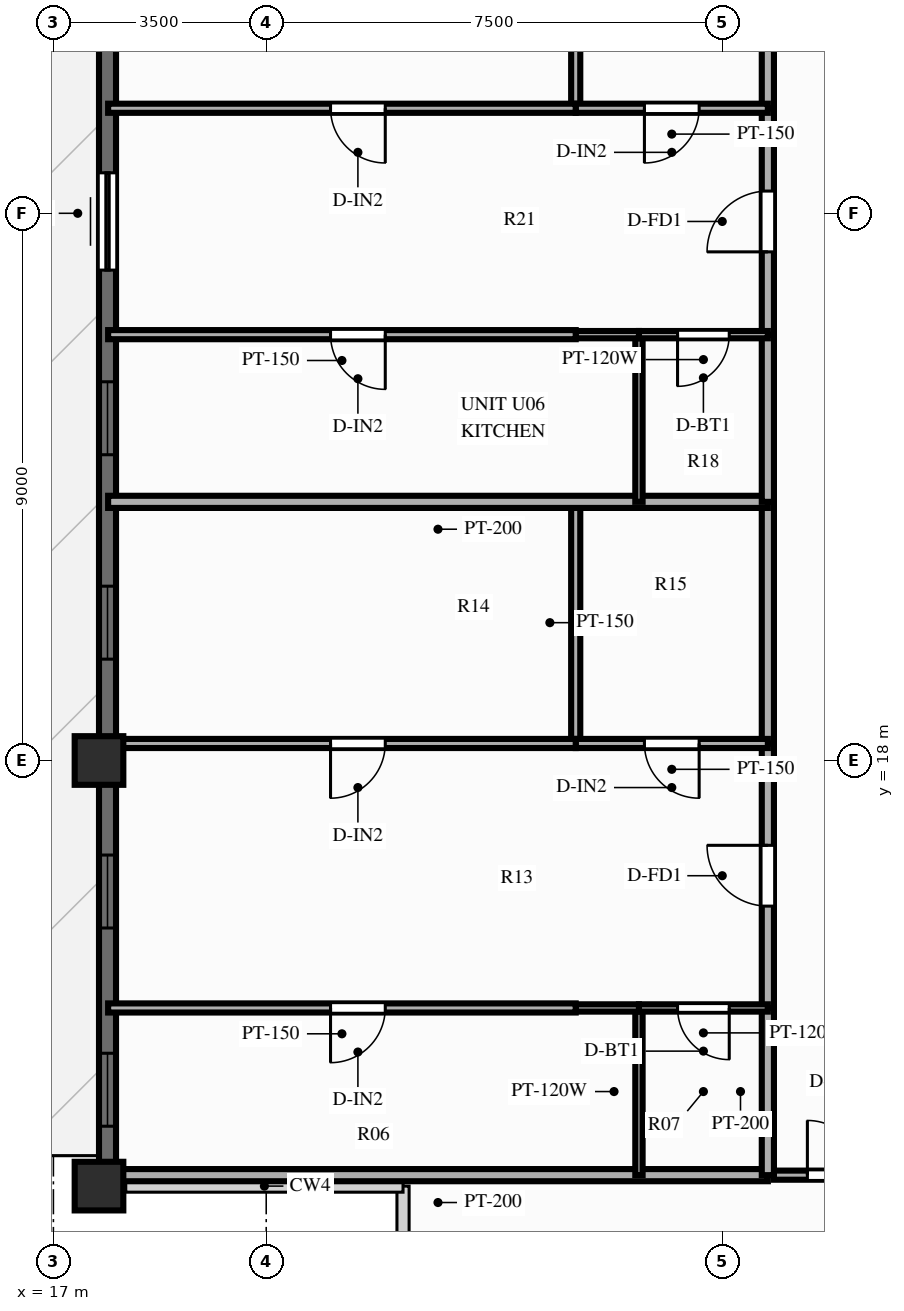
"""IFC4 building model, lengths in metres.
Left out: names, types, materials, properties, quantities, classifications, styles, units other than length and angle.
Written with IfcOpenShell. Run it as: python <this file> out.ifc"""

import sys

from ifc_helpers import new_model, si_unit, direction, frame, frame_2d, origin, origin_2d, place, context, subcontext, project, spatial, rectangle, extrude, source, transform, mapped, element, fill, save


model = new_model("IFC4")
c1 = context("Model", 3, precision=1e-05, world=origin(), true_north=direction((0.0, 1.0)))
c2 = subcontext(c1, "Body", "Model", "MODEL_VIEW")
j1 = project(units=[si_unit("LENGTHUNIT", "METRE"), si_unit("PLANEANGLEUNIT", "RADIAN")], contexts=[c1])
p1 = place(None, origin())
s1 = spatial("IfcSite", under=j1, at=p1, CompositionType="ELEMENT")
p2 = place(p1, origin())
s2 = spatial("IfcBuilding", under=s1, at=p2, CompositionType="ELEMENT")
p3 = place(p2, frame((0.0, 0.0, 176.8)))
s3 = spatial("IfcBuildingStorey", under=s2, at=p3, CompositionType="ELEMENT", Elevation=176.8)
m1 = source(origin(), c2, "Body", "SweptSolid", [
    extrude(rectangle(XDim=0.8, YDim=0.8, at=origin_2d()), origin(), (0.0, 0.0, 1.0), 3.0),
])
for number, where, z_axis, x_axis in (
    (1, (17.75, 18.0, 0.0), (0.0, 0.0, 1.0), (1.0, 0.0, 0.0)),
    (2, (17.75, 11.0, 0.0), (0.0, 0.0, 1.0), (1.0, 0.0, 0.0)),
):
    element("IfcColumn", number, at=place(p3, frame(where, z_axis=z_axis, x_axis=x_axis)), inside=s3, PredefinedType="COLUMN", context=c2, shape_type="MappedRepresentation", body=[
        mapped(m1, transform((0.0, 0.0, 0.0), scale=1.0)),
    ])
p4 = place(p3, frame((17.89, 11.0, 0.0), z_axis=(0.0, 0.0, 1.0), x_axis=(0.0, 1.0, 0.0)))
e3 = element("IfcWall", 3, at=p4, inside=s3, PredefinedType="SOLIDWALL", context=c2, shape_type="SweptSolid", body=[
    extrude(rectangle(XDim=32.0, YDim=0.28, at=frame_2d((16.0, 0.0))), origin(), (0.0, 0.0, 1.0), 2.28),
])
p5 = place(p4, frame((0.985, 0.0, 0.25)))
e4 = element("IfcOpeningElement", 4, at=p5, cuts=e3, PredefinedType="OPENING", context=c2, shape_type="SweptSolid", body=[
    extrude(rectangle(XDim=1.2, YDim=1.5, at=frame_2d((0.6, 0.75))), frame((0.0, 0.152, 0.0), z_axis=(0.0, -1.0, 0.0), x_axis=(1.0, 0.0, 0.0)), (0.0, 0.0, 1.0), 0.304),
])
p6 = place(p4, frame((4.245, 0.0, 0.25)))
e5 = element("IfcOpeningElement", 5, at=p6, cuts=e3, PredefinedType="OPENING", context=c2, shape_type="SweptSolid", body=[
    extrude(rectangle(XDim=1.2, YDim=1.5, at=frame_2d((0.6, 0.75))), frame((0.0, 0.152, 0.0), z_axis=(0.0, -1.0, 0.0), x_axis=(1.0, 0.0, 0.0)), (0.0, 0.0, 1.0), 0.304),
])
p7 = place(p4, frame((8.667, 0.0, 0.25)))
e6 = element("IfcOpeningElement", 6, at=p7, cuts=e3, PredefinedType="OPENING", context=c2, shape_type="SweptSolid", body=[
    extrude(rectangle(XDim=1.2, YDim=1.5, at=frame_2d((0.6, 0.75))), frame((0.0, 0.152, 0.0), z_axis=(0.0, -1.0, 0.0), x_axis=(1.0, 0.0, 0.0)), (0.0, 0.0, 1.0), 0.304),
])
p8 = place(p4, frame((12.029, 0.0, 0.25)))
e7 = element("IfcOpeningElement", 7, at=p8, cuts=e3, PredefinedType="OPENING", context=c2, shape_type="SweptSolid", body=[
    extrude(rectangle(XDim=1.2, YDim=1.5, at=frame_2d((0.6, 0.75))), frame((0.0, 0.152, 0.0), z_axis=(0.0, -1.0, 0.0), x_axis=(1.0, 0.0, 0.0)), (0.0, 0.0, 1.0), 0.304),
])
p9 = place(p4, frame((15.066, 0.0, 0.0)))
e8 = element("IfcOpeningElement", 8, at=p9, cuts=e3, PredefinedType="OPENING", context=c2, shape_type="SweptSolid", body=[
    extrude(rectangle(XDim=1.6, YDim=2.15, at=frame_2d((0.8, 1.075))), frame((0.0, 0.152, 0.0), z_axis=(0.0, -1.0, 0.0), x_axis=(1.0, 0.0, 0.0)), (0.0, 0.0, 1.0), 0.304),
])
p10 = place(p4, frame((19.111, 0.0, 0.25)))
e9 = element("IfcOpeningElement", 9, at=p10, cuts=e3, PredefinedType="OPENING", context=c2, shape_type="SweptSolid", body=[
    extrude(rectangle(XDim=1.2, YDim=1.5, at=frame_2d((0.6, 0.75))), frame((0.0, 0.152, 0.0), z_axis=(0.0, -1.0, 0.0), x_axis=(1.0, 0.0, 0.0)), (0.0, 0.0, 1.0), 0.304),
])
p11 = place(p4, frame((22.47, 0.0, 0.25)))
e10 = element("IfcOpeningElement", 10, at=p11, cuts=e3, PredefinedType="OPENING", context=c2, shape_type="SweptSolid", body=[
    extrude(rectangle(XDim=1.2, YDim=1.5, at=frame_2d((0.6, 0.75))), frame((0.0, 0.152, 0.0), z_axis=(0.0, -1.0, 0.0), x_axis=(1.0, 0.0, 0.0)), (0.0, 0.0, 1.0), 0.304),
])
p12 = place(p4, frame((26.006, 0.0, 0.25)))
e11 = element("IfcOpeningElement", 11, at=p12, cuts=e3, PredefinedType="OPENING", context=c2, shape_type="SweptSolid", body=[
    extrude(rectangle(XDim=1.2, YDim=1.5, at=frame_2d((0.6, 0.75))), frame((0.0, 0.152, 0.0), z_axis=(0.0, -1.0, 0.0), x_axis=(1.0, 0.0, 0.0)), (0.0, 0.0, 1.0), 0.304),
])
p13 = place(p4, frame((29.266, 0.0, 0.25)))
e12 = element("IfcOpeningElement", 12, at=p13, cuts=e3, PredefinedType="OPENING", context=c2, shape_type="SweptSolid", body=[
    extrude(rectangle(XDim=1.2, YDim=1.5, at=frame_2d((0.6, 0.75))), frame((0.0, 0.152, 0.0), z_axis=(0.0, -1.0, 0.0), x_axis=(1.0, 0.0, 0.0)), (0.0, 0.0, 1.0), 0.304),
])
p14 = place(p3, frame((28.85, 11.18, 0.0), z_axis=(0.0, 0.0, 1.0), x_axis=(1.0, 0.0, 0.0)))
e13 = element("IfcWall", 13, at=p14, inside=s3, PredefinedType="PARTITIONING", context=c2, shape_type="SweptSolid", body=[
    extrude(rectangle(XDim=2.33, YDim=0.15, at=frame_2d((1.165, 0.0))), origin(), (0.0, 0.0, 1.0), 2.79),
])
p15 = place(p14, frame((0.55, 0.0, 0.0)))
e14 = element("IfcOpeningElement", 14, at=p15, cuts=e13, PredefinedType="OPENING", context=c2, shape_type="SweptSolid", body=[
    extrude(rectangle(XDim=0.9, YDim=2.1, at=frame_2d((0.45, 1.05))), frame((0.0, 0.087, 0.0), z_axis=(0.0, -1.0, 0.0), x_axis=(1.0, 0.0, 0.0)), (0.0, 0.0, 1.0), 0.174),
])
p16 = place(p3, frame((28.75, 11.18, 0.0), z_axis=(0.0, 0.0, 1.0), x_axis=(-1.0, 0.0, 0.0)))
e15 = element("IfcWall", 15, at=p16, inside=s3, PredefinedType="PARTITIONING", context=c2, shape_type="SweptSolid", body=[
    extrude(rectangle(XDim=10.85, YDim=0.2, at=frame_2d((5.425, 0.0))), origin(), (0.0, 0.0, 1.0), 2.79),
])
p17 = place(p3, frame((28.75, 11.18, 0.0), z_axis=(0.0, 0.0, 1.0), x_axis=(0.0, 1.0, 0.0)))
e16 = element("IfcWall", 16, at=p17, inside=s3, PredefinedType="PARTITIONING", context=c2, shape_type="SweptSolid", body=[
    extrude(rectangle(XDim=2.75, YDim=0.2, at=frame_2d((1.375, 0.0))), origin(), (0.0, 0.0, 1.0), 2.79),
])
p18 = place(p3, frame((28.75, 13.93, 0.0), z_axis=(0.0, 0.0, 1.0), x_axis=(0.0, 1.0, 0.0)))
e17 = element("IfcWall", 17, at=p18, inside=s3, PredefinedType="PARTITIONING", context=c2, shape_type="SweptSolid", body=[
    extrude(rectangle(XDim=4.35, YDim=0.2, at=frame_2d((2.175, 0.0))), origin(), (0.0, 0.0, 1.0), 2.79),
])
p19 = place(p18, frame((1.675, 0.0, 0.0)))
e18 = element("IfcOpeningElement", 18, at=p19, cuts=e17, PredefinedType="OPENING", context=c2, shape_type="SweptSolid", body=[
    extrude(rectangle(XDim=1.0, YDim=2.15, at=frame_2d((0.5, 1.075))), frame((0.0, 0.112, 0.0), z_axis=(0.0, -1.0, 0.0), x_axis=(1.0, 0.0, 0.0)), (0.0, 0.0, 1.0), 0.224),
])
p20 = place(p3, frame((28.75, 18.28, 0.0), z_axis=(0.0, 0.0, 1.0), x_axis=(0.0, 1.0, 0.0)))
e19 = element("IfcWall", 19, at=p20, inside=s3, PredefinedType="PARTITIONING", context=c2, shape_type="SweptSolid", body=[
    extrude(rectangle(XDim=3.974, YDim=0.2, at=frame_2d((1.987, 0.0))), origin(), (0.0, 0.0, 1.0), 2.79),
])
p21 = place(p3, frame((26.63, 11.18, 0.0), z_axis=(0.0, 0.0, 1.0), x_axis=(0.0, 1.0, 0.0)))
e20 = element("IfcWall", 20, at=p21, inside=s3, PredefinedType="PARTITIONING", context=c2, shape_type="SweptSolid", body=[
    extrude(rectangle(XDim=2.75, YDim=0.12, at=frame_2d((1.375, 0.0))), origin(), (0.0, 0.0, 1.0), 2.79),
])
p22 = place(p3, frame((25.59, 18.28, 0.0), z_axis=(0.0, 0.0, 1.0), x_axis=(0.0, 1.0, 0.0)))
e21 = element("IfcWall", 21, at=p22, inside=s3, PredefinedType="PARTITIONING", context=c2, shape_type="SweptSolid", body=[
    extrude(rectangle(XDim=3.974, YDim=0.15, at=frame_2d((1.987, 0.0))), origin(), (0.0, 0.0, 1.0), 2.79),
])
p23 = place(p3, frame((28.75, 13.93, 0.0), z_axis=(0.0, 0.0, 1.0), x_axis=(-1.0, 0.0, 0.0)))
e22 = element("IfcWall", 22, at=p23, inside=s3, PredefinedType="PARTITIONING", context=c2, shape_type="SweptSolid", body=[
    extrude(rectangle(XDim=2.12, YDim=0.12, at=frame_2d((1.06, 0.0))), origin(), (0.0, 0.0, 1.0), 2.79),
])
p24 = place(p23, frame((0.635, 0.0, 0.0)))
e23 = element("IfcOpeningElement", 23, at=p24, cuts=e22, PredefinedType="OPENING", context=c2, shape_type="SweptSolid", body=[
    extrude(rectangle(XDim=0.85, YDim=2.05, at=frame_2d((0.425, 1.025))), frame((0.0, 0.072, 0.0), z_axis=(0.0, -1.0, 0.0), x_axis=(1.0, 0.0, 0.0)), (0.0, 0.0, 1.0), 0.144),
])
p25 = place(p3, frame((26.63, 13.93, 0.0), z_axis=(0.0, 0.0, 1.0), x_axis=(-1.0, 0.0, 0.0)))
e24 = element("IfcWall", 24, at=p25, inside=s3, PredefinedType="PARTITIONING", context=c2, shape_type="SweptSolid", body=[
    extrude(rectangle(XDim=1.04, YDim=0.12, at=frame_2d((0.52, 0.0))), origin(), (0.0, 0.0, 1.0), 2.79),
])
p26 = place(p3, frame((25.59, 13.93, 0.0), z_axis=(0.0, 0.0, 1.0), x_axis=(-1.0, 0.0, 0.0)))
e25 = element("IfcWall", 25, at=p26, inside=s3, PredefinedType="PARTITIONING", context=c2, shape_type="SweptSolid", body=[
    extrude(rectangle(XDim=7.69, YDim=0.15, at=frame_2d((3.845, 0.0))), origin(), (0.0, 0.0, 1.0), 2.79),
])
p27 = place(p26, frame((3.132, 0.0, 0.0)))
e26 = element("IfcOpeningElement", 26, at=p27, cuts=e25, PredefinedType="OPENING", context=c2, shape_type="SweptSolid", body=[
    extrude(rectangle(XDim=0.9, YDim=2.1, at=frame_2d((0.45, 1.05))), frame((0.0, 0.087, 0.0), z_axis=(0.0, -1.0, 0.0), x_axis=(1.0, 0.0, 0.0)), (0.0, 0.0, 1.0), 0.174),
])
p28 = place(p3, frame((28.75, 18.28, 0.0), z_axis=(0.0, 0.0, 1.0), x_axis=(-1.0, 0.0, 0.0)))
e27 = element("IfcWall", 27, at=p28, inside=s3, PredefinedType="PARTITIONING", context=c2, shape_type="SweptSolid", body=[
    extrude(rectangle(XDim=3.16, YDim=0.15, at=frame_2d((1.58, 0.0))), origin(), (0.0, 0.0, 1.0), 2.79),
])
p29 = place(p28, frame((1.13, 0.0, 0.0)))
e28 = element("IfcOpeningElement", 28, at=p29, cuts=e27, PredefinedType="OPENING", context=c2, shape_type="SweptSolid", body=[
    extrude(rectangle(XDim=0.9, YDim=2.1, at=frame_2d((0.45, 1.05))), frame((0.0, 0.087, 0.0), z_axis=(0.0, -1.0, 0.0), x_axis=(1.0, 0.0, 0.0)), (0.0, 0.0, 1.0), 0.174),
])
p30 = place(p3, frame((25.59, 18.28, 0.0), z_axis=(0.0, 0.0, 1.0), x_axis=(-1.0, 0.0, 0.0)))
e29 = element("IfcWall", 29, at=p30, inside=s3, PredefinedType="PARTITIONING", context=c2, shape_type="SweptSolid", body=[
    extrude(rectangle(XDim=7.69, YDim=0.15, at=frame_2d((3.845, 0.0))), origin(), (0.0, 0.0, 1.0), 2.79),
])
p31 = place(p30, frame((3.132, 0.0, 0.0)))
e30 = element("IfcOpeningElement", 30, at=p31, cuts=e29, PredefinedType="OPENING", context=c2, shape_type="SweptSolid", body=[
    extrude(rectangle(XDim=0.9, YDim=2.1, at=frame_2d((0.45, 1.05))), frame((0.0, 0.087, 0.0), z_axis=(0.0, -1.0, 0.0), x_axis=(1.0, 0.0, 0.0)), (0.0, 0.0, 1.0), 0.174),
])
p32 = place(p3, frame((28.75, 22.254, 0.0), z_axis=(0.0, 0.0, 1.0), x_axis=(-1.0, 0.0, 0.0)))
e31 = element("IfcWall", 31, at=p32, inside=s3, PredefinedType="PARTITIONING", context=c2, shape_type="SweptSolid", body=[
    extrude(rectangle(XDim=10.85, YDim=0.2, at=frame_2d((5.425, 0.0))), origin(), (0.0, 0.0, 1.0), 2.39),
])
p33 = place(p3, frame((28.75, 22.254, 0.0), z_axis=(0.0, 0.0, 1.0), x_axis=(0.0, 1.0, 0.0)))
e32 = element("IfcWall", 32, at=p33, inside=s3, PredefinedType="PARTITIONING", context=c2, shape_type="SweptSolid", body=[
    extrude(rectangle(XDim=2.75, YDim=0.2, at=frame_2d((1.375, 0.0))), origin(), (0.0, 0.0, 1.0), 2.79),
])
p34 = place(p3, frame((28.75, 25.004, 0.0), z_axis=(0.0, 0.0, 1.0), x_axis=(0.0, 1.0, 0.0)))
e33 = element("IfcWall", 33, at=p34, inside=s3, PredefinedType="PARTITIONING", context=c2, shape_type="SweptSolid", body=[
    extrude(rectangle(XDim=3.724, YDim=0.2, at=frame_2d((1.862, 0.0))), origin(), (0.0, 0.0, 1.0), 2.79),
])
p35 = place(p34, frame((1.362, 0.0, 0.0)))
e34 = element("IfcOpeningElement", 34, at=p35, cuts=e33, PredefinedType="OPENING", context=c2, shape_type="SweptSolid", body=[
    extrude(rectangle(XDim=1.0, YDim=2.15, at=frame_2d((0.5, 1.075))), frame((0.0, 0.112, 0.0), z_axis=(0.0, -1.0, 0.0), x_axis=(1.0, 0.0, 0.0)), (0.0, 0.0, 1.0), 0.224),
])
p36 = place(p3, frame((28.75, 28.728, 0.0), z_axis=(0.0, 0.0, 1.0), x_axis=(0.0, 1.0, 0.0)))
e35 = element("IfcWall", 35, at=p36, inside=s3, PredefinedType="PARTITIONING", context=c2, shape_type="SweptSolid", body=[
    extrude(rectangle(XDim=3.968, YDim=0.2, at=frame_2d((1.984, 0.0))), origin(), (0.0, 0.0, 1.0), 2.79),
])
p37 = place(p3, frame((26.63, 22.254, 0.0), z_axis=(0.0, 0.0, 1.0), x_axis=(0.0, 1.0, 0.0)))
e36 = element("IfcWall", 36, at=p37, inside=s3, PredefinedType="PARTITIONING", context=c2, shape_type="SweptSolid", body=[
    extrude(rectangle(XDim=2.75, YDim=0.12, at=frame_2d((1.375, 0.0))), origin(), (0.0, 0.0, 1.0), 2.79),
])
p38 = place(p3, frame((25.59, 28.728, 0.0), z_axis=(0.0, 0.0, 1.0), x_axis=(0.0, 1.0, 0.0)))
e37 = element("IfcWall", 37, at=p38, inside=s3, PredefinedType="PARTITIONING", context=c2, shape_type="SweptSolid", body=[
    extrude(rectangle(XDim=3.968, YDim=0.15, at=frame_2d((1.984, 0.0))), origin(), (0.0, 0.0, 1.0), 2.79),
])
p39 = place(p3, frame((28.75, 25.004, 0.0), z_axis=(0.0, 0.0, 1.0), x_axis=(-1.0, 0.0, 0.0)))
e38 = element("IfcWall", 38, at=p39, inside=s3, PredefinedType="PARTITIONING", context=c2, shape_type="SweptSolid", body=[
    extrude(rectangle(XDim=2.12, YDim=0.12, at=frame_2d((1.06, 0.0))), origin(), (0.0, 0.0, 1.0), 2.79),
])
p40 = place(p39, frame((0.635, 0.0, 0.0)))
e39 = element("IfcOpeningElement", 39, at=p40, cuts=e38, PredefinedType="OPENING", context=c2, shape_type="SweptSolid", body=[
    extrude(rectangle(XDim=0.85, YDim=2.05, at=frame_2d((0.425, 1.025))), frame((0.0, 0.072, 0.0), z_axis=(0.0, -1.0, 0.0), x_axis=(1.0, 0.0, 0.0)), (0.0, 0.0, 1.0), 0.144),
])
p41 = place(p3, frame((26.63, 25.004, 0.0), z_axis=(0.0, 0.0, 1.0), x_axis=(-1.0, 0.0, 0.0)))
e40 = element("IfcWall", 40, at=p41, inside=s3, PredefinedType="PARTITIONING", context=c2, shape_type="SweptSolid", body=[
    extrude(rectangle(XDim=1.04, YDim=0.12, at=frame_2d((0.52, 0.0))), origin(), (0.0, 0.0, 1.0), 2.79),
])
p42 = place(p3, frame((25.59, 25.004, 0.0), z_axis=(0.0, 0.0, 1.0), x_axis=(-1.0, 0.0, 0.0)))
e41 = element("IfcWall", 41, at=p42, inside=s3, PredefinedType="PARTITIONING", context=c2, shape_type="SweptSolid", body=[
    extrude(rectangle(XDim=7.69, YDim=0.15, at=frame_2d((3.845, 0.0))), origin(), (0.0, 0.0, 1.0), 2.79),
])
p43 = place(p42, frame((3.132, 0.0, 0.0)))
e42 = element("IfcOpeningElement", 42, at=p43, cuts=e41, PredefinedType="OPENING", context=c2, shape_type="SweptSolid", body=[
    extrude(rectangle(XDim=0.9, YDim=2.1, at=frame_2d((0.45, 1.05))), frame((0.0, 0.087, 0.0), z_axis=(0.0, -1.0, 0.0), x_axis=(1.0, 0.0, 0.0)), (0.0, 0.0, 1.0), 0.174),
])
p44 = place(p3, frame((28.75, 28.728, 0.0), z_axis=(0.0, 0.0, 1.0), x_axis=(-1.0, 0.0, 0.0)))
e43 = element("IfcWall", 43, at=p44, inside=s3, PredefinedType="PARTITIONING", context=c2, shape_type="SweptSolid", body=[
    extrude(rectangle(XDim=3.16, YDim=0.15, at=frame_2d((1.58, 0.0))), origin(), (0.0, 0.0, 1.0), 2.79),
])
p45 = place(p44, frame((1.13, 0.0, 0.0)))
e44 = element("IfcOpeningElement", 44, at=p45, cuts=e43, PredefinedType="OPENING", context=c2, shape_type="SweptSolid", body=[
    extrude(rectangle(XDim=0.9, YDim=2.1, at=frame_2d((0.45, 1.05))), frame((0.0, 0.087, 0.0), z_axis=(0.0, -1.0, 0.0), x_axis=(1.0, 0.0, 0.0)), (0.0, 0.0, 1.0), 0.174),
])
p46 = place(p3, frame((25.59, 28.728, 0.0), z_axis=(0.0, 0.0, 1.0), x_axis=(-1.0, 0.0, 0.0)))
e45 = element("IfcWall", 45, at=p46, inside=s3, PredefinedType="PARTITIONING", context=c2, shape_type="SweptSolid", body=[
    extrude(rectangle(XDim=7.69, YDim=0.15, at=frame_2d((3.845, 0.0))), origin(), (0.0, 0.0, 1.0), 2.79),
])
p47 = place(p46, frame((3.132, 0.0, 0.0)))
e46 = element("IfcOpeningElement", 46, at=p47, cuts=e45, PredefinedType="OPENING", context=c2, shape_type="SweptSolid", body=[
    extrude(rectangle(XDim=0.9, YDim=2.1, at=frame_2d((0.45, 1.05))), frame((0.0, 0.087, 0.0), z_axis=(0.0, -1.0, 0.0), x_axis=(1.0, 0.0, 0.0)), (0.0, 0.0, 1.0), 0.174),
])
m2 = source(origin(), c2, "Body", "SweptSolid", [
    extrude(rectangle(XDim=1.2, YDim=1.5, at=frame_2d((0.6, 0.75))), frame((0.0, 0.03, 0.0), z_axis=(0.0, -1.0, 0.0), x_axis=(1.0, 0.0, 0.0)), (0.0, 0.0, 1.0), 0.06),
])
p48 = place(p5, origin())
e47 = element("IfcWindow", 47, at=p48, inside=s3, PartitioningType="SINGLE_PANEL", PredefinedType="WINDOW", context=c2, shape_type="MappedRepresentation", body=[
    mapped(m2, transform((0.0, 0.0, 0.0), scale=1.0)),
])
fill(e4, e47)
p49 = place(p6, origin())
e48 = element("IfcWindow", 48, at=p49, inside=s3, PartitioningType="SINGLE_PANEL", PredefinedType="WINDOW", context=c2, shape_type="MappedRepresentation", body=[
    mapped(m2, transform((0.0, 0.0, 0.0), scale=1.0)),
])
fill(e5, e48)
p50 = place(p7, origin())
e49 = element("IfcWindow", 49, at=p50, inside=s3, PartitioningType="SINGLE_PANEL", PredefinedType="WINDOW", context=c2, shape_type="MappedRepresentation", body=[
    mapped(m2, transform((0.0, 0.0, 0.0), scale=1.0)),
])
fill(e6, e49)
p51 = place(p8, origin())
e50 = element("IfcWindow", 50, at=p51, inside=s3, PartitioningType="SINGLE_PANEL", PredefinedType="WINDOW", context=c2, shape_type="MappedRepresentation", body=[
    mapped(m2, transform((0.0, 0.0, 0.0), scale=1.0)),
])
fill(e7, e50)
m3 = source(origin(), c2, "Body", "SweptSolid", [
    extrude(rectangle(XDim=1.6, YDim=2.15, at=frame_2d((0.8, 1.075))), frame((0.0, 0.025, 0.0), z_axis=(0.0, -1.0, 0.0), x_axis=(1.0, 0.0, 0.0)), (0.0, 0.0, 1.0), 0.05),
])
p52 = place(p9, origin())
e51 = element("IfcDoor", 51, at=p52, inside=s3, OperationType="SLIDING_TO_LEFT", PredefinedType="DOOR", context=c2, shape_type="MappedRepresentation", body=[
    mapped(m3, transform((0.0, 0.0, 0.0), scale=1.0)),
])
fill(e8, e51)
m4 = source(origin(), c2, "Body", "SweptSolid", [
    extrude(rectangle(XDim=0.9, YDim=2.1, at=frame_2d((0.45, 1.05))), frame((0.0, 0.025, 0.0), z_axis=(0.0, -1.0, 0.0), x_axis=(1.0, 0.0, 0.0)), (0.0, 0.0, 1.0), 0.05),
])
p53 = place(p15, origin())
e52 = element("IfcDoor", 52, at=p53, inside=s3, OperationType="SINGLE_SWING_LEFT", PredefinedType="DOOR", context=c2, shape_type="MappedRepresentation", body=[
    mapped(m4, transform((0.0, 0.0, 0.0), scale=1.0)),
])
fill(e14, e52)
m5 = source(origin(), c2, "Body", "SweptSolid", [
    extrude(rectangle(XDim=1.0, YDim=2.15, at=frame_2d((0.5, 1.075))), frame((0.0, 0.025, 0.0), z_axis=(0.0, -1.0, 0.0), x_axis=(1.0, 0.0, 0.0)), (0.0, 0.0, 1.0), 0.05),
])
p54 = place(p19, origin())
e53 = element("IfcDoor", 53, at=p54, inside=s3, OperationType="SINGLE_SWING_RIGHT", PredefinedType="DOOR", context=c2, shape_type="MappedRepresentation", body=[
    mapped(m5, transform((0.0, 0.0, 0.0), scale=1.0)),
])
fill(e18, e53)
m6 = source(origin(), c2, "Body", "SweptSolid", [
    extrude(rectangle(XDim=0.85, YDim=2.05, at=frame_2d((0.425, 1.025))), frame((0.0, 0.025, 0.0), z_axis=(0.0, -1.0, 0.0), x_axis=(1.0, 0.0, 0.0)), (0.0, 0.0, 1.0), 0.05),
])
p55 = place(p24, origin())
e54 = element("IfcDoor", 54, at=p55, inside=s3, OperationType="SINGLE_SWING_LEFT", PredefinedType="DOOR", context=c2, shape_type="MappedRepresentation", body=[
    mapped(m6, transform((0.0, 0.0, 0.0), scale=1.0)),
])
fill(e23, e54)
p56 = place(p27, origin())
e55 = element("IfcDoor", 55, at=p56, inside=s3, OperationType="SINGLE_SWING_RIGHT", PredefinedType="DOOR", context=c2, shape_type="MappedRepresentation", body=[
    mapped(m4, transform((0.0, 0.0, 0.0), scale=1.0)),
])
fill(e26, e55)
p57 = place(p29, origin())
e56 = element("IfcDoor", 56, at=p57, inside=s3, OperationType="SINGLE_SWING_LEFT", PredefinedType="DOOR", context=c2, shape_type="MappedRepresentation", body=[
    mapped(m4, transform((0.0, 0.0, 0.0), scale=1.0)),
])
fill(e28, e56)
p58 = place(p31, origin())
e57 = element("IfcDoor", 57, at=p58, inside=s3, OperationType="SINGLE_SWING_RIGHT", PredefinedType="DOOR", context=c2, shape_type="MappedRepresentation", body=[
    mapped(m4, transform((0.0, 0.0, 0.0), scale=1.0)),
])
fill(e30, e57)
p59 = place(p35, origin())
e58 = element("IfcDoor", 58, at=p59, inside=s3, OperationType="SINGLE_SWING_LEFT", PredefinedType="DOOR", context=c2, shape_type="MappedRepresentation", body=[
    mapped(m5, transform((0.0, 0.0, 0.0), scale=1.0)),
])
fill(e34, e58)
p60 = place(p40, origin())
e59 = element("IfcDoor", 59, at=p60, inside=s3, OperationType="SINGLE_SWING_RIGHT", PredefinedType="DOOR", context=c2, shape_type="MappedRepresentation", body=[
    mapped(m6, transform((0.0, 0.0, 0.0), scale=1.0)),
])
fill(e39, e59)
p61 = place(p43, origin())
e60 = element("IfcDoor", 60, at=p61, inside=s3, OperationType="SINGLE_SWING_LEFT", PredefinedType="DOOR", context=c2, shape_type="MappedRepresentation", body=[
    mapped(m4, transform((0.0, 0.0, 0.0), scale=1.0)),
])
fill(e42, e60)
p62 = place(p45, origin())
e61 = element("IfcDoor", 61, at=p62, inside=s3, OperationType="SINGLE_SWING_RIGHT", PredefinedType="DOOR", context=c2, shape_type="MappedRepresentation", body=[
    mapped(m4, transform((0.0, 0.0, 0.0), scale=1.0)),
])
fill(e44, e61)
p63 = place(p47, origin())
e62 = element("IfcDoor", 62, at=p63, inside=s3, OperationType="SINGLE_SWING_LEFT", PredefinedType="DOOR", context=c2, shape_type="MappedRepresentation", body=[
    mapped(m4, transform((0.0, 0.0, 0.0), scale=1.0)),
])
fill(e46, e62)
save(model, sys.argv[1])
